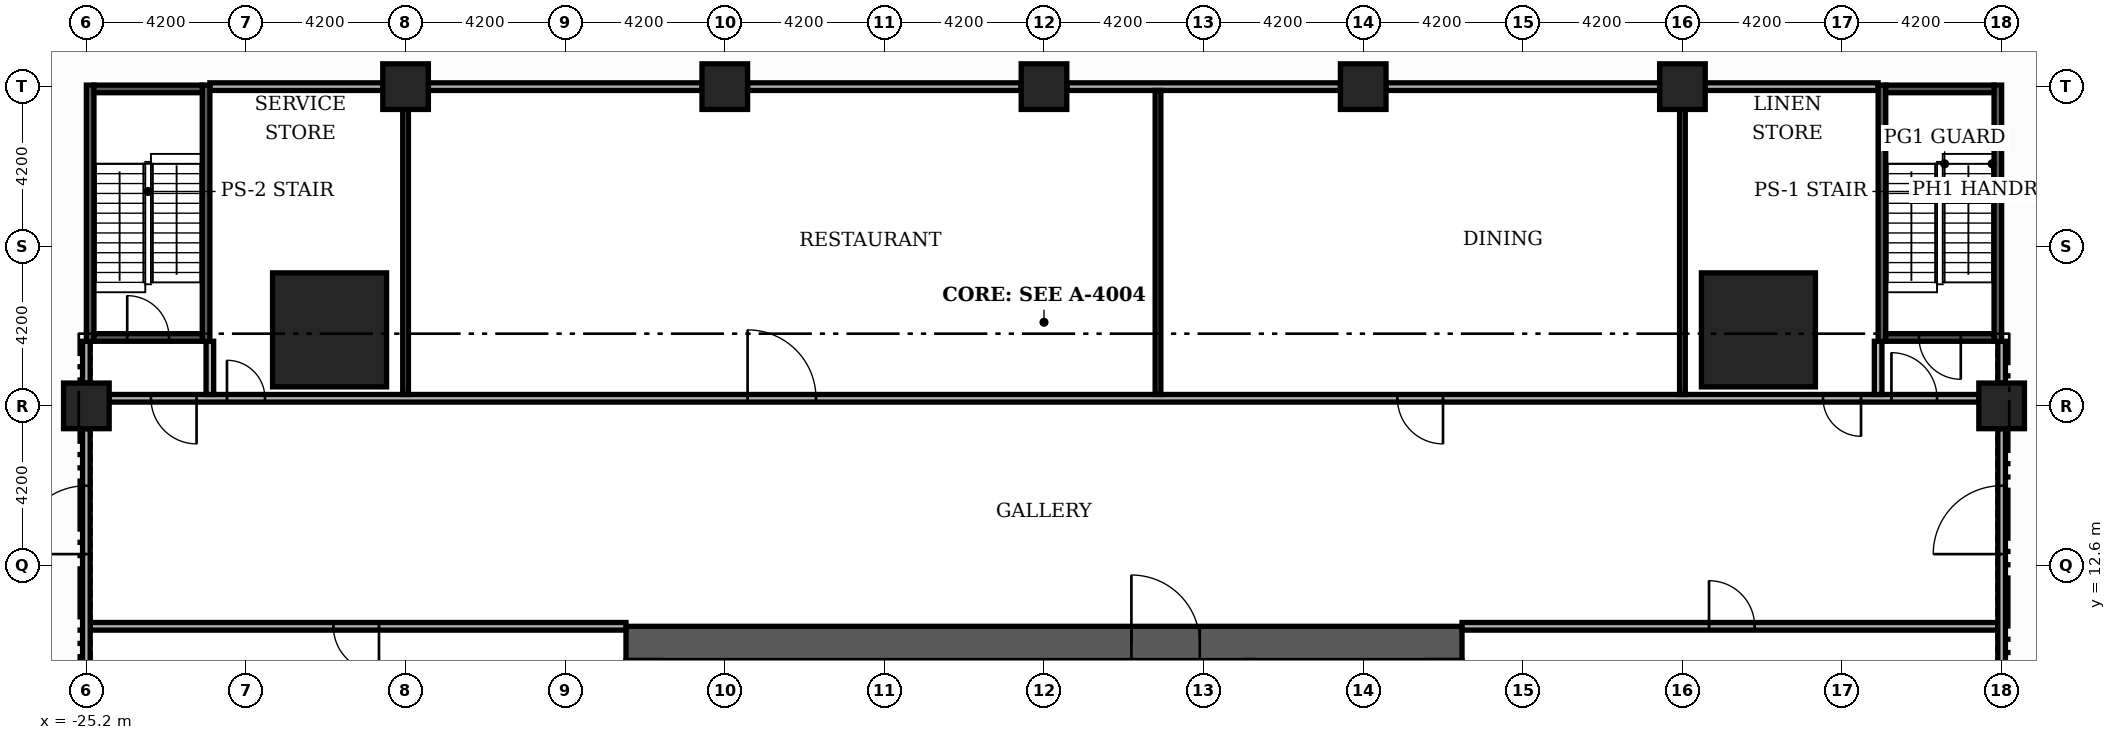
"""IFC4 building model, lengths in metres.
Left out: names, types, materials, properties, quantities, classifications, styles, units other than length and angle.
Written with IfcOpenShell. Run it as: python <this file> out.ifc"""

import sys

from ifc_helpers import new_model, si_unit, direction, frame, frame_2d, origin, origin_2d, place, context, subcontext, project, spatial, rectangle, extrude, element, fill, save


model = new_model("IFC4")
c1 = context("Model", 3, precision=1e-05, world=origin(), true_north=direction((0.0, 1.0)))
c2 = subcontext(c1, "Body", "Model", "MODEL_VIEW")
j1 = project(units=[si_unit("LENGTHUNIT", "METRE"), si_unit("PLANEANGLEUNIT", "RADIAN")], contexts=[c1])
p1 = place(None, origin())
s1 = spatial("IfcSite", under=j1, at=p1, CompositionType="ELEMENT")
p2 = place(p1, origin())
s2 = spatial("IfcBuilding", under=s1, at=p2, CompositionType="ELEMENT")
p3 = place(p2, frame((0.0, 0.0, 7.2)))
s3 = spatial("IfcBuildingStorey", under=s2, at=p3, CompositionType="ELEMENT", Elevation=7.2)
p4 = place(p3, frame((-11.0, 10.55, 0.0), z_axis=(0.0, 0.0, 1.0), x_axis=(1.0, 0.0, 0.0)))
e1 = element("IfcWall", 1, at=p4, inside=s3, PredefinedType="SHEAR", context=c2, shape_type="SweptSolid", body=[
    extrude(rectangle(XDim=22.0, YDim=0.9, at=frame_2d((11.0, 0.0))), origin(), (0.0, 0.0, 1.0), 4.38),
])
p5 = place(p4, frame((13.3, 0.0, 0.0)))
e2 = element("IfcOpeningElement", 2, at=p5, cuts=e1, PredefinedType="OPENING", context=c2, shape_type="SweptSolid", body=[
    extrude(rectangle(XDim=1.8, YDim=2.2, at=frame_2d((0.9, 1.1))), frame((0.0, 0.46, 0.0), z_axis=(0.0, -1.0, 0.0), x_axis=(1.0, 0.0, 0.0)), (0.0, 0.0, 1.0), 0.92),
])
for number, where, z_axis, x_axis in (
    (3, (18.8, 18.8, 0.0), (0.0, 0.0, 1.0), (1.0, 0.0, 0.0)),
    (4, (-18.8, 18.8, 0.0), (0.0, 0.0, 1.0), (1.0, 0.0, 0.0)),
):
    element("IfcColumn", number, at=place(p3, frame(where, z_axis=z_axis, x_axis=x_axis)), inside=s3, PredefinedType="COLUMN", context=c2, shape_type="SweptSolid", body=[
        extrude(rectangle(XDim=3.0, YDim=3.0, at=origin_2d()), origin(), (0.0, 0.0, 1.0), 4.8),
    ])
for number, where, z_axis, x_axis in (
    (5, (25.2, 16.8, 0.0), (0.0, 0.0, 1.0), (1.0, 0.0, 0.0)),
    (6, (0.0, 25.2, 0.0), (0.0, 0.0, 1.0), (1.0, 0.0, 0.0)),
    (7, (-8.4, 25.2, 0.0), (0.0, 0.0, 1.0), (1.0, 0.0, 0.0)),
    (8, (-16.8, 25.2, 0.0), (0.0, 0.0, 1.0), (1.0, 0.0, 0.0)),
    (9, (8.4, 25.2, 0.0), (0.0, 0.0, 1.0), (1.0, 0.0, 0.0)),
    (10, (16.8, 25.2, 0.0), (0.0, 0.0, 1.0), (1.0, 0.0, 0.0)),
    (11, (-25.2, 16.8, 0.0), (0.0, 0.0, 1.0), (1.0, 0.0, 0.0)),
):
    element("IfcColumn", number, at=place(p3, frame(where, z_axis=z_axis, x_axis=x_axis)), inside=s3, PredefinedType="COLUMN", context=c2, shape_type="SweptSolid", body=[
        extrude(rectangle(XDim=1.2, YDim=1.2, at=origin_2d()), origin(), (0.0, 0.0, 1.0), 4.8),
    ])
p6 = place(p3, frame((-25.1, 11.0, 0.0), z_axis=(0.0, 0.0, 1.0), x_axis=(1.0, 0.0, 0.0)))
e12 = element("IfcWall", 12, at=p6, inside=s3, PredefinedType="PARTITIONING", context=c2, shape_type="SweptSolid", body=[
    extrude(rectangle(XDim=14.1, YDim=0.2, at=frame_2d((7.05, 0.0))), origin(), (0.0, 0.0, 1.0), 4.38),
])
p7 = place(p6, frame((6.4, 0.0, 0.0)))
e13 = element("IfcOpeningElement", 13, at=p7, cuts=e12, PredefinedType="OPENING", context=c2, shape_type="SweptSolid", body=[
    extrude(rectangle(XDim=1.2, YDim=2.2, at=frame_2d((0.6, 1.1))), frame((0.0, 0.11, 0.0), z_axis=(0.0, -1.0, 0.0), x_axis=(1.0, 0.0, 0.0)), (0.0, 0.0, 1.0), 0.22),
])
p8 = place(p3, frame((11.0, 11.0, 0.0), z_axis=(0.0, 0.0, 1.0), x_axis=(1.0, 0.0, 0.0)))
e14 = element("IfcWall", 14, at=p8, inside=s3, PredefinedType="PARTITIONING", context=c2, shape_type="SweptSolid", body=[
    extrude(rectangle(XDim=14.1, YDim=0.2, at=frame_2d((7.05, 0.0))), origin(), (0.0, 0.0, 1.0), 4.38),
])
p9 = place(p8, frame((6.5, 0.0, 0.0)))
e15 = element("IfcOpeningElement", 15, at=p9, cuts=e14, PredefinedType="OPENING", context=c2, shape_type="SweptSolid", body=[
    extrude(rectangle(XDim=1.2, YDim=2.2, at=frame_2d((0.6, 1.1))), frame((0.0, 0.11, 0.0), z_axis=(0.0, -1.0, 0.0), x_axis=(1.0, 0.0, 0.0)), (0.0, 0.0, 1.0), 0.22),
])
p10 = place(p3, frame((-24.6, 17.0, 0.0), z_axis=(0.0, 0.0, 1.0), x_axis=(1.0, 0.0, 0.0)))
e16 = element("IfcWall", 16, at=p10, inside=s3, PredefinedType="PARTITIONING", context=c2, shape_type="SweptSolid", body=[
    extrude(rectangle(XDim=49.2, YDim=0.2, at=frame_2d((24.6, 0.0))), origin(), (0.0, 0.0, 1.0), 4.38),
])
p11 = place(p10, frame((1.1, 0.0, 0.0)))
e17 = element("IfcOpeningElement", 17, at=p11, cuts=e16, PredefinedType="OPENING", context=c2, shape_type="SweptSolid", body=[
    extrude(rectangle(XDim=1.2, YDim=2.2, at=frame_2d((0.6, 1.1))), frame((0.0, 0.11, 0.0), z_axis=(0.0, -1.0, 0.0), x_axis=(1.0, 0.0, 0.0)), (0.0, 0.0, 1.0), 0.22),
])
p12 = place(p10, frame((3.1, 0.0, 0.0)))
e18 = element("IfcOpeningElement", 18, at=p12, cuts=e16, PredefinedType="OPENING", context=c2, shape_type="SweptSolid", body=[
    extrude(rectangle(XDim=1.0, YDim=2.1, at=frame_2d((0.5, 1.05))), frame((0.0, 0.11, 0.0), z_axis=(0.0, -1.0, 0.0), x_axis=(1.0, 0.0, 0.0)), (0.0, 0.0, 1.0), 0.22),
])
p13 = place(p10, frame((16.8, 0.0, 0.0)))
e19 = element("IfcOpeningElement", 19, at=p13, cuts=e16, PredefinedType="OPENING", context=c2, shape_type="SweptSolid", body=[
    extrude(rectangle(XDim=1.8, YDim=2.2, at=frame_2d((0.9, 1.1))), frame((0.0, 0.11, 0.0), z_axis=(0.0, -1.0, 0.0), x_axis=(1.0, 0.0, 0.0)), (0.0, 0.0, 1.0), 0.22),
])
p14 = place(p10, frame((33.9, 0.0, 0.0)))
e20 = element("IfcOpeningElement", 20, at=p14, cuts=e16, PredefinedType="OPENING", context=c2, shape_type="SweptSolid", body=[
    extrude(rectangle(XDim=1.2, YDim=2.2, at=frame_2d((0.6, 1.1))), frame((0.0, 0.11, 0.0), z_axis=(0.0, -1.0, 0.0), x_axis=(1.0, 0.0, 0.0)), (0.0, 0.0, 1.0), 0.22),
])
p15 = place(p10, frame((45.1, 0.0, 0.0)))
e21 = element("IfcOpeningElement", 21, at=p15, cuts=e16, PredefinedType="OPENING", context=c2, shape_type="SweptSolid", body=[
    extrude(rectangle(XDim=1.0, YDim=2.1, at=frame_2d((0.5, 1.05))), frame((0.0, 0.11, 0.0), z_axis=(0.0, -1.0, 0.0), x_axis=(1.0, 0.0, 0.0)), (0.0, 0.0, 1.0), 0.22),
])
p16 = place(p10, frame((46.9, 0.0, 0.0)))
e22 = element("IfcOpeningElement", 22, at=p16, cuts=e16, PredefinedType="OPENING", context=c2, shape_type="SweptSolid", body=[
    extrude(rectangle(XDim=1.2, YDim=2.2, at=frame_2d((0.6, 1.1))), frame((0.0, 0.11, 0.0), z_axis=(0.0, -1.0, 0.0), x_axis=(1.0, 0.0, 0.0)), (0.0, 0.0, 1.0), 0.22),
])
p17 = place(p3, frame((-21.95, 25.2, 0.0), z_axis=(0.0, 0.0, 1.0), x_axis=(1.0, 0.0, 0.0)))
e23 = element("IfcWall", 23, at=p17, inside=s3, PredefinedType="PARTITIONING", context=c2, shape_type="SweptSolid", body=[
    extrude(rectangle(XDim=4.55, YDim=0.2, at=frame_2d((2.275, 0.0))), origin(), (0.0, 0.0, 1.0), 4.08),
])
for number, where, z_axis, x_axis in (
    (24, (-16.2, 25.2, 0.0), (0.0, 0.0, 1.0), (1.0, 0.0, 0.0)),
    (25, (-7.8, 25.2, 0.0), (0.0, 0.0, 1.0), (1.0, 0.0, 0.0)),
    (26, (0.6, 25.2, 0.0), (0.0, 0.0, 1.0), (1.0, 0.0, 0.0)),
    (27, (9.0, 25.2, 0.0), (0.0, 0.0, 1.0), (1.0, 0.0, 0.0)),
):
    element("IfcWall", number, at=place(p3, frame(where, z_axis=z_axis, x_axis=x_axis)), inside=s3, PredefinedType="PARTITIONING", context=c2, shape_type="SweptSolid", body=[
        extrude(rectangle(XDim=7.2, YDim=0.2, at=frame_2d((3.6, 0.0))), origin(), (0.0, 0.0, 1.0), 4.08),
    ])
p18 = place(p3, frame((17.4, 25.2, 0.0), z_axis=(0.0, 0.0, 1.0), x_axis=(1.0, 0.0, 0.0)))
e28 = element("IfcWall", 28, at=p18, inside=s3, PredefinedType="PARTITIONING", context=c2, shape_type="SweptSolid", body=[
    extrude(rectangle(XDim=4.55, YDim=0.2, at=frame_2d((2.275, 0.0))), origin(), (0.0, 0.0, 1.0), 4.08),
])
p19 = place(p3, frame((-25.2, 9.0, 0.0), z_axis=(0.0, 0.0, 1.0), x_axis=(0.0, 1.0, 0.0)))
e29 = element("IfcWall", 29, at=p19, inside=s3, PredefinedType="PARTITIONING", context=c2, shape_type="SweptSolid", body=[
    extrude(rectangle(XDim=7.2, YDim=0.2, at=frame_2d((3.6, 0.0))), origin(), (0.0, 0.0, 1.0), 4.08),
])
p20 = place(p19, frame((3.9, 0.0, 0.0)))
e30 = element("IfcOpeningElement", 30, at=p20, cuts=e29, PredefinedType="OPENING", context=c2, shape_type="SweptSolid", body=[
    extrude(rectangle(XDim=1.8, YDim=2.2, at=frame_2d((0.9, 1.1))), frame((0.0, 0.11, 0.0), z_axis=(0.0, -1.0, 0.0), x_axis=(1.0, 0.0, 0.0)), (0.0, 0.0, 1.0), 0.22),
])
p21 = place(p3, frame((-25.2, 17.4, 0.0), z_axis=(0.0, 0.0, 1.0), x_axis=(0.0, 1.0, 0.0)))
e31 = element("IfcWall", 31, at=p21, inside=s3, PredefinedType="PARTITIONING", context=c2, shape_type="SweptSolid", body=[
    extrude(rectangle(XDim=1.1, YDim=0.2, at=frame_2d((0.55, 0.0))), origin(), (0.0, 0.0, 1.0), 3.98),
])
p22 = place(p3, frame((-21.95, 17.1, 0.0), z_axis=(0.0, 0.0, 1.0), x_axis=(0.0, 1.0, 0.0)))
e32 = element("IfcWall", 32, at=p22, inside=s3, PredefinedType="PARTITIONING", context=c2, shape_type="SweptSolid", body=[
    extrude(rectangle(XDim=1.4, YDim=0.2, at=frame_2d((0.7, 0.0))), origin(), (0.0, 0.0, 1.0), 4.38),
])
p23 = place(p3, frame((-16.8, 17.1, 0.0), z_axis=(0.0, 0.0, 1.0), x_axis=(0.0, 1.0, 0.0)))
e33 = element("IfcWall", 33, at=p23, inside=s3, PredefinedType="PARTITIONING", context=c2, shape_type="SweptSolid", body=[
    extrude(rectangle(XDim=7.5, YDim=0.15, at=frame_2d((3.75, 0.0))), origin(), (0.0, 0.0, 1.0), 4.38),
])
p24 = place(p3, frame((3.0, 17.1, 0.0), z_axis=(0.0, 0.0, 1.0), x_axis=(0.0, 1.0, 0.0)))
e34 = element("IfcWall", 34, at=p24, inside=s3, PredefinedType="PARTITIONING", context=c2, shape_type="SweptSolid", body=[
    extrude(rectangle(XDim=8.0, YDim=0.15, at=frame_2d((4.0, 0.0))), origin(), (0.0, 0.0, 1.0), 4.38),
])
p25 = place(p3, frame((16.8, 17.1, 0.0), z_axis=(0.0, 0.0, 1.0), x_axis=(0.0, 1.0, 0.0)))
e35 = element("IfcWall", 35, at=p25, inside=s3, PredefinedType="PARTITIONING", context=c2, shape_type="SweptSolid", body=[
    extrude(rectangle(XDim=7.5, YDim=0.15, at=frame_2d((3.75, 0.0))), origin(), (0.0, 0.0, 1.0), 4.38),
])
p26 = place(p3, frame((21.95, 17.1, 0.0), z_axis=(0.0, 0.0, 1.0), x_axis=(0.0, 1.0, 0.0)))
e36 = element("IfcWall", 36, at=p26, inside=s3, PredefinedType="PARTITIONING", context=c2, shape_type="SweptSolid", body=[
    extrude(rectangle(XDim=1.4, YDim=0.2, at=frame_2d((0.7, 0.0))), origin(), (0.0, 0.0, 1.0), 4.38),
])
p27 = place(p3, frame((25.2, 9.0, 0.0), z_axis=(0.0, 0.0, 1.0), x_axis=(0.0, 1.0, 0.0)))
e37 = element("IfcWall", 37, at=p27, inside=s3, PredefinedType="PARTITIONING", context=c2, shape_type="SweptSolid", body=[
    extrude(rectangle(XDim=7.2, YDim=0.2, at=frame_2d((3.6, 0.0))), origin(), (0.0, 0.0, 1.0), 4.08),
])
p28 = place(p27, frame((3.9, 0.0, 0.0)))
e38 = element("IfcOpeningElement", 38, at=p28, cuts=e37, PredefinedType="OPENING", context=c2, shape_type="SweptSolid", body=[
    extrude(rectangle(XDim=1.8, YDim=2.2, at=frame_2d((0.9, 1.1))), frame((0.0, 0.11, 0.0), z_axis=(0.0, -1.0, 0.0), x_axis=(1.0, 0.0, 0.0)), (0.0, 0.0, 1.0), 0.22),
])
p29 = place(p3, frame((25.2, 17.4, 0.0), z_axis=(0.0, 0.0, 1.0), x_axis=(0.0, 1.0, 0.0)))
e39 = element("IfcWall", 39, at=p29, inside=s3, PredefinedType="PARTITIONING", context=c2, shape_type="SweptSolid", body=[
    extrude(rectangle(XDim=1.1, YDim=0.2, at=frame_2d((0.55, 0.0))), origin(), (0.0, 0.0, 1.0), 3.98),
])
p30 = place(p3, frame((22.05, 18.5, 0.0), z_axis=(0.0, 0.0, 1.0), x_axis=(0.0, 1.0, 0.0)))
e40 = element("IfcWall", 40, at=p30, inside=s3, PredefinedType="SOLIDWALL", context=c2, shape_type="SweptSolid", body=[
    extrude(rectangle(XDim=6.74, YDim=0.2, at=frame_2d((3.37, 0.0))), origin(), (0.0, 0.0, 1.0), 4.38),
])
p31 = place(p3, frame((25.1, 18.5, 0.0), z_axis=(0.0, 0.0, 1.0), x_axis=(0.0, 1.0, 0.0)))
e41 = element("IfcWall", 41, at=p31, inside=s3, PredefinedType="SOLIDWALL", context=c2, shape_type="SweptSolid", body=[
    extrude(rectangle(XDim=6.74, YDim=0.2, at=frame_2d((3.37, 0.0))), origin(), (0.0, 0.0, 1.0), 3.98),
])
p32 = place(p3, frame((22.15, 18.6, 0.0), z_axis=(0.0, 0.0, 1.0), x_axis=(1.0, 0.0, 0.0)))
e42 = element("IfcWall", 42, at=p32, inside=s3, PredefinedType="SOLIDWALL", context=c2, shape_type="SweptSolid", body=[
    extrude(rectangle(XDim=2.85, YDim=0.2, at=frame_2d((1.425, 0.0))), origin(), (0.0, 0.0, 1.0), 4.38),
])
p33 = place(p32, frame((0.875, 0.0, 0.0)))
e43 = element("IfcOpeningElement", 43, at=p33, cuts=e42, PredefinedType="OPENING", context=c2, shape_type="SweptSolid", body=[
    extrude(rectangle(XDim=1.1, YDim=2.2, at=frame_2d((0.55, 1.1))), frame((0.0, 0.11, 0.0), z_axis=(0.0, -1.0, 0.0), x_axis=(1.0, 0.0, 0.0)), (0.0, 0.0, 1.0), 0.22),
])
p34 = place(p3, frame((22.15, 25.14, 0.0), z_axis=(0.0, 0.0, 1.0), x_axis=(1.0, 0.0, 0.0)))
e44 = element("IfcWall", 44, at=p34, inside=s3, PredefinedType="SOLIDWALL", context=c2, shape_type="SweptSolid", body=[
    extrude(rectangle(XDim=2.85, YDim=0.2, at=frame_2d((1.425, 0.0))), origin(), (0.0, 0.0, 1.0), 4.08),
])
p35 = place(p3, frame((-25.1, 18.5, 0.0), z_axis=(0.0, 0.0, 1.0), x_axis=(0.0, 1.0, 0.0)))
e45 = element("IfcWall", 45, at=p35, inside=s3, PredefinedType="SOLIDWALL", context=c2, shape_type="SweptSolid", body=[
    extrude(rectangle(XDim=6.74, YDim=0.2, at=frame_2d((3.37, 0.0))), origin(), (0.0, 0.0, 1.0), 3.98),
])
p36 = place(p3, frame((-22.05, 18.5, 0.0), z_axis=(0.0, 0.0, 1.0), x_axis=(0.0, 1.0, 0.0)))
e46 = element("IfcWall", 46, at=p36, inside=s3, PredefinedType="SOLIDWALL", context=c2, shape_type="SweptSolid", body=[
    extrude(rectangle(XDim=6.74, YDim=0.2, at=frame_2d((3.37, 0.0))), origin(), (0.0, 0.0, 1.0), 4.38),
])
p37 = place(p3, frame((-25.0, 18.6, 0.0), z_axis=(0.0, 0.0, 1.0), x_axis=(1.0, 0.0, 0.0)))
e47 = element("IfcWall", 47, at=p37, inside=s3, PredefinedType="SOLIDWALL", context=c2, shape_type="SweptSolid", body=[
    extrude(rectangle(XDim=2.85, YDim=0.2, at=frame_2d((1.425, 0.0))), origin(), (0.0, 0.0, 1.0), 4.38),
])
p38 = place(p37, frame((0.875, 0.0, 0.0)))
e48 = element("IfcOpeningElement", 48, at=p38, cuts=e47, PredefinedType="OPENING", context=c2, shape_type="SweptSolid", body=[
    extrude(rectangle(XDim=1.1, YDim=2.2, at=frame_2d((0.55, 1.1))), frame((0.0, 0.11, 0.0), z_axis=(0.0, -1.0, 0.0), x_axis=(1.0, 0.0, 0.0)), (0.0, 0.0, 1.0), 0.22),
])
p39 = place(p3, frame((-25.0, 25.14, 0.0), z_axis=(0.0, 0.0, 1.0), x_axis=(1.0, 0.0, 0.0)))
e49 = element("IfcWall", 49, at=p39, inside=s3, PredefinedType="SOLIDWALL", context=c2, shape_type="SweptSolid", body=[
    extrude(rectangle(XDim=2.85, YDim=0.2, at=frame_2d((1.425, 0.0))), origin(), (0.0, 0.0, 1.0), 4.08),
])
p40 = place(p5, origin())
e50 = element("IfcDoor", 50, at=p40, inside=s3, OperationType="DOUBLE_DOOR_SINGLE_SWING", PredefinedType="DOOR", context=c2, shape_type="SweptSolid", body=[
    extrude(rectangle(XDim=1.8, YDim=2.2, at=frame_2d((0.9, 1.1))), frame((0.0, 0.025, 0.0), z_axis=(0.0, -1.0, 0.0), x_axis=(1.0, 0.0, 0.0)), (0.0, 0.0, 1.0), 0.05),
])
fill(e2, e50)
p41 = place(p7, origin())
e51 = element("IfcDoor", 51, at=p41, inside=s3, OperationType="SINGLE_SWING_RIGHT", PredefinedType="DOOR", context=c2, shape_type="SweptSolid", body=[
    extrude(rectangle(XDim=1.2, YDim=2.2, at=frame_2d((0.6, 1.1))), frame((0.0, 0.025, 0.0), z_axis=(0.0, -1.0, 0.0), x_axis=(1.0, 0.0, 0.0)), (0.0, 0.0, 1.0), 0.05),
])
fill(e13, e51)
p42 = place(p9, origin())
e52 = element("IfcDoor", 52, at=p42, inside=s3, OperationType="SINGLE_SWING_LEFT", PredefinedType="DOOR", context=c2, shape_type="SweptSolid", body=[
    extrude(rectangle(XDim=1.2, YDim=2.2, at=frame_2d((0.6, 1.1))), frame((0.0, 0.025, 0.0), z_axis=(0.0, -1.0, 0.0), x_axis=(1.0, 0.0, 0.0)), (0.0, 0.0, 1.0), 0.05),
])
fill(e15, e52)
p43 = place(p20, origin())
e53 = element("IfcDoor", 53, at=p43, inside=s3, OperationType="DOUBLE_DOOR_SINGLE_SWING", PredefinedType="DOOR", context=c2, shape_type="SweptSolid", body=[
    extrude(rectangle(XDim=1.8, YDim=2.2, at=frame_2d((0.9, 1.1))), frame((0.0, 0.025, 0.0), z_axis=(0.0, -1.0, 0.0), x_axis=(1.0, 0.0, 0.0)), (0.0, 0.0, 1.0), 0.05),
])
fill(e30, e53)
p44 = place(p28, origin())
e54 = element("IfcDoor", 54, at=p44, inside=s3, OperationType="DOUBLE_DOOR_SINGLE_SWING", PredefinedType="DOOR", context=c2, shape_type="SweptSolid", body=[
    extrude(rectangle(XDim=1.8, YDim=2.2, at=frame_2d((0.9, 1.1))), frame((0.0, 0.025, 0.0), z_axis=(0.0, -1.0, 0.0), x_axis=(1.0, 0.0, 0.0)), (0.0, 0.0, 1.0), 0.05),
])
fill(e38, e54)
p45 = place(p11, origin())
e55 = element("IfcDoor", 55, at=p45, inside=s3, OperationType="SINGLE_SWING_RIGHT", PredefinedType="DOOR", context=c2, shape_type="SweptSolid", body=[
    extrude(rectangle(XDim=1.2, YDim=2.2, at=frame_2d((0.6, 1.1))), frame((0.0, 0.025, 0.0), z_axis=(0.0, -1.0, 0.0), x_axis=(1.0, 0.0, 0.0)), (0.0, 0.0, 1.0), 0.05),
])
fill(e17, e55)
p46 = place(p12, origin())
e56 = element("IfcDoor", 56, at=p46, inside=s3, OperationType="SINGLE_SWING_LEFT", PredefinedType="DOOR", context=c2, shape_type="SweptSolid", body=[
    extrude(rectangle(XDim=1.0, YDim=2.1, at=frame_2d((0.5, 1.05))), frame((0.0, 0.025, 0.0), z_axis=(0.0, -1.0, 0.0), x_axis=(1.0, 0.0, 0.0)), (0.0, 0.0, 1.0), 0.05),
])
fill(e18, e56)
p47 = place(p13, origin())
e57 = element("IfcDoor", 57, at=p47, inside=s3, OperationType="DOUBLE_DOOR_SINGLE_SWING", PredefinedType="DOOR", context=c2, shape_type="SweptSolid", body=[
    extrude(rectangle(XDim=1.8, YDim=2.2, at=frame_2d((0.9, 1.1))), frame((0.0, 0.025, 0.0), z_axis=(0.0, -1.0, 0.0), x_axis=(1.0, 0.0, 0.0)), (0.0, 0.0, 1.0), 0.05),
])
fill(e19, e57)
p48 = place(p14, origin())
e58 = element("IfcDoor", 58, at=p48, inside=s3, OperationType="SINGLE_SWING_RIGHT", PredefinedType="DOOR", context=c2, shape_type="SweptSolid", body=[
    extrude(rectangle(XDim=1.2, YDim=2.2, at=frame_2d((0.6, 1.1))), frame((0.0, 0.025, 0.0), z_axis=(0.0, -1.0, 0.0), x_axis=(1.0, 0.0, 0.0)), (0.0, 0.0, 1.0), 0.05),
])
fill(e20, e58)
p49 = place(p15, origin())
e59 = element("IfcDoor", 59, at=p49, inside=s3, OperationType="SINGLE_SWING_RIGHT", PredefinedType="DOOR", context=c2, shape_type="SweptSolid", body=[
    extrude(rectangle(XDim=1.0, YDim=2.1, at=frame_2d((0.5, 1.05))), frame((0.0, 0.025, 0.0), z_axis=(0.0, -1.0, 0.0), x_axis=(1.0, 0.0, 0.0)), (0.0, 0.0, 1.0), 0.05),
])
fill(e21, e59)
p50 = place(p16, origin())
e60 = element("IfcDoor", 60, at=p50, inside=s3, OperationType="SINGLE_SWING_LEFT", PredefinedType="DOOR", context=c2, shape_type="SweptSolid", body=[
    extrude(rectangle(XDim=1.2, YDim=2.2, at=frame_2d((0.6, 1.1))), frame((0.0, 0.025, 0.0), z_axis=(0.0, -1.0, 0.0), x_axis=(1.0, 0.0, 0.0)), (0.0, 0.0, 1.0), 0.05),
])
fill(e22, e60)
p51 = place(p33, origin())
e61 = element("IfcDoor", 61, at=p51, inside=s3, OperationType="SINGLE_SWING_RIGHT", PredefinedType="DOOR", context=c2, shape_type="SweptSolid", body=[
    extrude(rectangle(XDim=1.1, YDim=2.2, at=frame_2d((0.55, 1.1))), frame((0.0, 0.025, 0.0), z_axis=(0.0, -1.0, 0.0), x_axis=(1.0, 0.0, 0.0)), (0.0, 0.0, 1.0), 0.05),
])
fill(e43, e61)
p52 = place(p38, origin())
e62 = element("IfcDoor", 62, at=p52, inside=s3, OperationType="SINGLE_SWING_LEFT", PredefinedType="DOOR", context=c2, shape_type="SweptSolid", body=[
    extrude(rectangle(XDim=1.1, YDim=2.2, at=frame_2d((0.55, 1.1))), frame((0.0, 0.025, 0.0), z_axis=(0.0, -1.0, 0.0), x_axis=(1.0, 0.0, 0.0)), (0.0, 0.0, 1.0), 0.05),
])
fill(e48, e62)
save(model, sys.argv[1])
